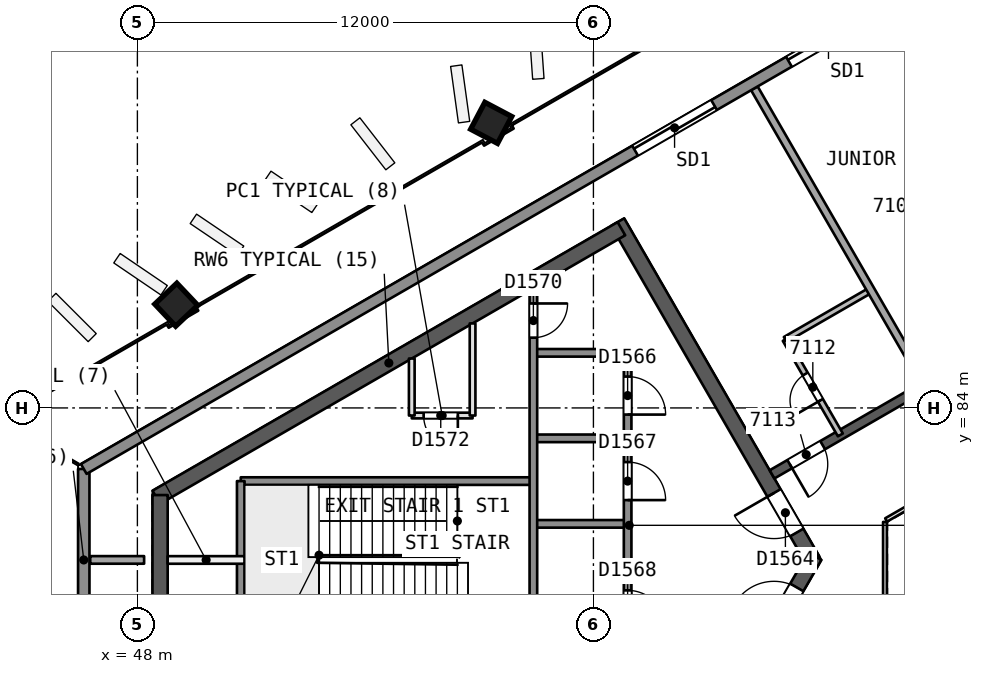
"""IFC4 building model, lengths in metres.
Left out: names, types, materials, properties, quantities, classifications, styles, units other than length and angle.
Written with IfcOpenShell. Run it as: python <this file> out.ifc"""

import sys

from ifc_helpers import new_model, si_unit, direction, frame, frame_2d, origin, origin_2d, place, context, subcontext, project, spatial, rectangle, extrude, element, fill, save


model = new_model("IFC4")
c1 = context("Model", 3, precision=1e-05, world=origin(), true_north=direction((0.0, 1.0)))
c2 = subcontext(c1, "Body", "Model", "MODEL_VIEW")
j1 = project(units=[si_unit("LENGTHUNIT", "METRE"), si_unit("PLANEANGLEUNIT", "RADIAN")], contexts=[c1])
p1 = place(None, origin())
s1 = spatial("IfcSite", under=j1, at=p1, CompositionType="ELEMENT")
p2 = place(p1, origin())
s2 = spatial("IfcBuilding", under=s1, at=p2, CompositionType="ELEMENT")
p3 = place(p2, frame((0.0, 0.0, 288.6)))
s3 = spatial("IfcBuildingStorey", under=s2, at=p3, CompositionType="ELEMENT", Elevation=288.6)
p4 = place(p3, frame((65.769, 80.0, 0.0), z_axis=(0.0, 0.0, 1.0), x_axis=(-0.50000177223, 0.866024380585, 0.0)))
e1 = element("IfcWall", 1, at=p4, inside=s3, PredefinedType="SHEAR", context=c2, shape_type="SweptSolid", body=[
    extrude(rectangle(XDim=10.265, YDim=0.4, at=frame_2d((5.132, 0.0))), origin(), (0.0, 0.0, 1.0), 3.7),
])
p5 = place(p4, frame((0.834, 0.0, 0.0)))
e2 = element("IfcOpeningElement", 2, at=p5, cuts=e1, PredefinedType="OPENING", context=c2, shape_type="SweptSolid", body=[
    extrude(rectangle(XDim=1.2, YDim=2.1, at=frame_2d((0.6, 1.05))), frame((0.0, 0.21, 0.0), z_axis=(0.0, -1.0, 0.0), x_axis=(1.0, 0.0, 0.0)), (0.0, 0.0, 1.0), 0.421),
])
p6 = place(p3, frame((60.737, 88.716, 0.0), z_axis=(0.0, 0.0, 1.0), x_axis=(-0.866028812667, -0.499994095595, 0.0)))
e3 = element("IfcWall", 3, at=p6, inside=s3, PredefinedType="SHEAR", context=c2, shape_type="SweptSolid", body=[
    extrude(rectangle(XDim=14.134, YDim=0.4, at=frame_2d((7.067, 0.0))), origin(), (0.0, 0.0, 1.0), 3.7),
])
p7 = place(p3, frame((48.597, 81.707, 0.0), z_axis=(0.0, 0.0, 1.0), x_axis=(0.0, -1.0, 0.0)))
e4 = element("IfcWall", 4, at=p7, inside=s3, PredefinedType="SHEAR", context=c2, shape_type="SweptSolid", body=[
    extrude(rectangle(XDim=3.53, YDim=0.4, at=frame_2d((1.765, 0.0))), origin(), (0.0, 0.0, 1.0), 3.7),
])
p8 = place(p3, frame((60.737, 71.284, 0.0), z_axis=(0.0, 0.0, 1.0), x_axis=(0.50000547566, 0.866022242388, 0.0)))
e5 = element("IfcWall", 5, at=p8, inside=s3, PredefinedType="SHEAR", context=c2, shape_type="SweptSolid", body=[
    extrude(rectangle(XDim=10.18, YDim=0.4, at=frame_2d((5.09, 0.0))), origin(), (0.0, 0.0, 1.0), 3.7),
])
p9 = place(p8, frame((8.03, 0.0, 0.0)))
e6 = element("IfcOpeningElement", 6, at=p9, cuts=e5, PredefinedType="OPENING", context=c2, shape_type="SweptSolid", body=[
    extrude(rectangle(XDim=1.2, YDim=2.1, at=frame_2d((0.6, 1.05))), frame((0.0, 0.21, 0.0), z_axis=(0.0, -1.0, 0.0), x_axis=(1.0, 0.0, 0.0)), (0.0, 0.0, 1.0), 0.421),
])
p10 = place(p3, frame((78.2, 90.046, 0.0), z_axis=(0.0, 0.0, 1.0), x_axis=(-0.866026492143, -0.499998114903, 0.0)))
e7 = element("IfcWall", 7, at=p10, inside=s3, PredefinedType="SHEAR", context=c2, shape_type="SweptSolid", body=[
    extrude(rectangle(XDim=15.588, YDim=0.25, at=frame_2d((7.794, 0.0))), origin(), (0.0, 0.0, 1.0), 3.3),
])
p11 = place(p10, frame((4.718, 0.0, 0.0)))
e8 = element("IfcOpeningElement", 8, at=p11, cuts=e7, PredefinedType="OPENING", context=c2, shape_type="SweptSolid", body=[
    extrude(rectangle(XDim=1.0, YDim=2.1, at=frame_2d((0.5, 1.05))), frame((0.0, 0.135, 0.0), z_axis=(0.0, -1.0, 0.0), x_axis=(1.0, 0.0, 0.0)), (0.0, 0.0, 1.0), 0.271),
])
p12 = place(p10, frame((9.374, 0.0, 0.0)))
e9 = element("IfcOpeningElement", 9, at=p12, cuts=e7, PredefinedType="OPENING", context=c2, shape_type="SweptSolid", body=[
    extrude(rectangle(XDim=1.0, YDim=2.1, at=frame_2d((0.5, 1.05))), frame((0.0, 0.135, 0.0), z_axis=(0.0, -1.0, 0.0), x_axis=(1.0, 0.0, 0.0)), (0.0, 0.0, 1.0), 0.271),
])
p13 = place(p10, frame((14.05, 0.0, 0.0)))
e10 = element("IfcOpeningElement", 10, at=p13, cuts=e7, PredefinedType="OPENING", context=c2, shape_type="SweptSolid", body=[
    extrude(rectangle(XDim=1.0, YDim=2.1, at=frame_2d((0.5, 1.05))), frame((0.0, 0.135, 0.0), z_axis=(0.0, -1.0, 0.0), x_axis=(1.0, 0.0, 0.0)), (0.0, 0.0, 1.0), 0.271),
])
p14 = place(p3, frame((57.287, 91.515, 0.0), z_axis=(0.019328516974, -0.012138044789, 0.999739504221), x_axis=(-0.500205614953, 0.865671455024, 0.020181048691)))
e11 = element("IfcColumn", 11, at=p14, inside=s3, PredefinedType="COLUMN", context=c2, shape_type="SweptSolid", body=[
    extrude(rectangle(XDim=0.8, YDim=0.8, at=origin_2d()), origin(), (0.0, 0.0, 1.0), 3.701),
])
p15 = place(p3, frame((48.989, 86.724, 0.0), z_axis=(0.02855911485, -0.006793507689, 0.999569019734), x_axis=(-0.500407643461, 0.865554709988, 0.020180049142)))
e12 = element("IfcColumn", 12, at=p15, inside=s3, PredefinedType="COLUMN", context=c2, shape_type="SweptSolid", body=[
    extrude(rectangle(XDim=0.8, YDim=0.8, at=origin_2d()), origin(), (0.0, 0.0, 1.0), 3.702),
])
p16 = place(p3, frame((64.235, 92.41, 0.0), z_axis=(0.0, 0.0, 1.0), x_axis=(0.500006411147, -0.866021702275, 0.0)))
e13 = element("IfcWall", 13, at=p16, inside=s3, PredefinedType="PARTITIONING", context=c2, shape_type="SweptSolid", body=[
    extrude(rectangle(XDim=9.03, YDim=0.2, at=frame_2d((4.515, 0.0))), origin(), (0.0, 0.0, 1.0), 3.3),
])
p17 = place(p3, frame((66.498, 83.29, 0.0), z_axis=(0.0, 0.0, 1.0), x_axis=(-0.499987231761, 0.866032775405, 0.0)))
e14 = element("IfcWall", 14, at=p17, inside=s3, PredefinedType="PARTITIONING", context=c2, shape_type="SweptSolid", body=[
    extrude(rectangle(XDim=2.9, YDim=0.15, at=frame_2d((1.45, 0.0))), origin(), (0.0, 0.0, 1.0), 3.3),
])
p18 = place(p17, frame((1.05, 0.0, 0.0)))
e15 = element("IfcOpeningElement", 15, at=p18, cuts=e14, PredefinedType="OPENING", context=c2, shape_type="SweptSolid", body=[
    extrude(rectangle(XDim=0.8, YDim=2.1, at=frame_2d((0.4, 1.05))), frame((0.0, 0.085, 0.0), z_axis=(0.0, -1.0, 0.0), x_axis=(1.0, 0.0, 0.0)), (0.0, 0.0, 1.0), 0.171),
])
p19 = place(p3, frame((65.048, 85.802, 0.0), z_axis=(0.0, 0.0, 1.0), x_axis=(0.866062058628, 0.499936506574, 0.0)))
e16 = element("IfcWall", 16, at=p19, inside=s3, PredefinedType="PARTITIONING", context=c2, shape_type="SweptSolid", body=[
    extrude(rectangle(XDim=2.6, YDim=0.15, at=frame_2d((1.3, 0.0))), origin(), (0.0, 0.0, 1.0), 3.3),
])
p20 = place(p3, frame((46.759, 80.001, 0.0), z_axis=(0.0, 0.0, 1.0), x_axis=(1.0, 0.0, 0.0)))
e17 = element("IfcWall", 17, at=p20, inside=s3, PredefinedType="PARTITIONING", context=c2, shape_type="SweptSolid", body=[
    extrude(rectangle(XDim=1.418, YDim=0.2, at=frame_2d((0.709, 0.0))), origin(), (0.0, 0.0, 1.0), 3.3),
])
p21 = place(p3, frame((46.589, 77.606, 0.0), z_axis=(0.0, 0.0, 1.0), x_axis=(0.0, 1.0, 0.0)))
e18 = element("IfcWall", 18, at=p21, inside=s3, PredefinedType="SOLIDWALL", context=c2, shape_type="SweptSolid", body=[
    extrude(rectangle(XDim=4.789, YDim=0.3, at=frame_2d((2.394, 0.0))), origin(), (0.0, 0.0, 1.0), 3.3),
])
p22 = place(p3, frame((46.589, 82.394, 0.0), z_axis=(0.0, 0.0, 1.0), x_axis=(0.866024664133, 0.500001281111, 0.0)))
e19 = element("IfcWall", 19, at=p22, inside=s3, PredefinedType="SOLIDWALL", context=c2, shape_type="SweptSolid", body=[
    extrude(rectangle(XDim=46.815, YDim=0.3, at=frame_2d((23.408, 0.0))), origin(), (0.0, 0.0, 1.0), 3.3),
])
p23 = place(p22, frame((16.752, 0.0, 0.0)))
e20 = element("IfcOpeningElement", 20, at=p23, cuts=e19, PredefinedType="OPENING", context=c2, shape_type="SweptSolid", body=[
    extrude(rectangle(XDim=2.4, YDim=2.4, at=frame_2d((1.2, 1.2))), frame((0.0, 0.161, 0.0), z_axis=(0.0, -1.0, 0.0), x_axis=(1.0, 0.0, 0.0)), (0.0, 0.0, 1.0), 0.321),
])
p24 = place(p22, frame((26.884, 0.0, 0.0)))
e21 = element("IfcOpeningElement", 21, at=p24, cuts=e19, PredefinedType="OPENING", context=c2, shape_type="SweptSolid", body=[
    extrude(rectangle(XDim=2.4, YDim=2.4, at=frame_2d((1.2, 1.2))), frame((0.0, 0.161, 0.0), z_axis=(0.0, -1.0, 0.0), x_axis=(1.0, 0.0, 0.0)), (0.0, 0.0, 1.0), 0.321),
])
p25 = place(p22, frame((21.428, 0.0, 0.0)))
e22 = element("IfcOpeningElement", 22, at=p25, cuts=e19, PredefinedType="OPENING", context=c2, shape_type="SweptSolid", body=[
    extrude(rectangle(XDim=2.4, YDim=2.4, at=frame_2d((1.2, 1.2))), frame((0.0, 0.161, 0.0), z_axis=(0.0, -1.0, 0.0), x_axis=(1.0, 0.0, 0.0)), (0.0, 0.0, 1.0), 0.321),
])
p26 = place(p3, frame((60.9, 85.45, 0.0), z_axis=(0.0, 0.0, 1.0), x_axis=(-1.0, 0.0, 0.0)))
e23 = element("IfcWall", 23, at=p26, inside=s3, PredefinedType="SOLIDWALL", context=c2, shape_type="SweptSolid", body=[
    extrude(rectangle(XDim=2.48, YDim=0.2, at=frame_2d((1.24, 0.0))), origin(), (0.0, 0.0, 1.0), 3.3),
])
p27 = place(p3, frame((56.82, 83.8, 0.0), z_axis=(0.0, 0.0, 1.0), x_axis=(-1.0, 0.0, 0.0)))
e24 = element("IfcWall", 24, at=p27, inside=s3, PredefinedType="PARTITIONING", context=c2, shape_type="SweptSolid", body=[
    extrude(rectangle(XDim=1.6, YDim=0.15, at=frame_2d((0.8, 0.0))), origin(), (0.0, 0.0, 1.0), 3.3),
])
p28 = place(p27, frame((0.387, 0.0, 0.0)))
e25 = element("IfcOpeningElement", 25, at=p28, cuts=e24, PredefinedType="OPENING", context=c2, shape_type="SweptSolid", body=[
    extrude(rectangle(XDim=0.9, YDim=2.1, at=frame_2d((0.45, 1.05))), frame((0.0, 0.085, 0.0), z_axis=(0.0, -1.0, 0.0), x_axis=(1.0, 0.0, 0.0)), (0.0, 0.0, 1.0), 0.171),
])
p29 = place(p3, frame((60.9, 83.2, 0.0), z_axis=(0.0, 0.0, 1.0), x_axis=(-1.0, 0.0, 0.0)))
e26 = element("IfcWall", 26, at=p29, inside=s3, PredefinedType="SOLIDWALL", context=c2, shape_type="SweptSolid", body=[
    extrude(rectangle(XDim=2.48, YDim=0.2, at=frame_2d((1.24, 0.0))), origin(), (0.0, 0.0, 1.0), 3.3),
])
p30 = place(p3, frame((58.42, 82.075, 0.0), z_axis=(0.0, 0.0, 1.0), x_axis=(-1.0, 0.0, 0.0)))
e27 = element("IfcWall", 27, at=p30, inside=s3, PredefinedType="SOLIDWALL", context=c2, shape_type="SweptSolid", body=[
    extrude(rectangle(XDim=7.7, YDim=0.2, at=frame_2d((3.85, 0.0))), origin(), (0.0, 0.0, 1.0), 3.3),
])
p31 = place(p3, frame((60.9, 80.95, 0.0), z_axis=(0.0, 0.0, 1.0), x_axis=(-1.0, 0.0, 0.0)))
e28 = element("IfcWall", 28, at=p31, inside=s3, PredefinedType="SOLIDWALL", context=c2, shape_type="SweptSolid", body=[
    extrude(rectangle(XDim=2.48, YDim=0.2, at=frame_2d((1.24, 0.0))), origin(), (0.0, 0.0, 1.0), 3.3),
])
p32 = place(p3, frame((50.82, 80.0, 0.0), z_axis=(0.0, 0.0, 1.0), x_axis=(-1.0, 0.0, 0.0)))
e29 = element("IfcWall", 29, at=p32, inside=s3, PredefinedType="PARTITIONING", context=c2, shape_type="SweptSolid", body=[
    extrude(rectangle(XDim=2.023, YDim=0.2, at=frame_2d((1.012, 0.0))), origin(), (0.0, 0.0, 1.0), 3.3),
])
p33 = place(p3, frame((60.9, 85.45, 0.0), z_axis=(0.0, 0.0, 1.0), x_axis=(0.0, -1.0, 0.0)))
e30 = element("IfcWall", 30, at=p33, inside=s3, PredefinedType="SOLIDWALL", context=c2, shape_type="SweptSolid", body=[
    extrude(rectangle(XDim=10.9, YDim=0.2, at=frame_2d((5.45, 0.0))), origin(), (0.0, 0.0, 1.0), 3.3),
])
p34 = place(p33, frame((0.625, 0.0, 0.0)))
e31 = element("IfcOpeningElement", 31, at=p34, cuts=e30, PredefinedType="OPENING", context=c2, shape_type="SweptSolid", body=[
    extrude(rectangle(XDim=1.0, YDim=2.1, at=frame_2d((0.5, 1.05))), frame((0.0, 0.11, 0.0), z_axis=(0.0, -1.0, 0.0), x_axis=(1.0, 0.0, 0.0)), (0.0, 0.0, 1.0), 0.221),
])
p35 = place(p33, frame((2.875, 0.0, 0.0)))
e32 = element("IfcOpeningElement", 32, at=p35, cuts=e30, PredefinedType="OPENING", context=c2, shape_type="SweptSolid", body=[
    extrude(rectangle(XDim=1.0, YDim=2.1, at=frame_2d((0.5, 1.05))), frame((0.0, 0.11, 0.0), z_axis=(0.0, -1.0, 0.0), x_axis=(1.0, 0.0, 0.0)), (0.0, 0.0, 1.0), 0.221),
])
p36 = place(p33, frame((6.25, 0.0, 0.0)))
e33 = element("IfcOpeningElement", 33, at=p36, cuts=e30, PredefinedType="OPENING", context=c2, shape_type="SweptSolid", body=[
    extrude(rectangle(XDim=1.0, YDim=2.1, at=frame_2d((0.5, 1.05))), frame((0.0, 0.11, 0.0), z_axis=(0.0, -1.0, 0.0), x_axis=(1.0, 0.0, 0.0)), (0.0, 0.0, 1.0), 0.221),
])
p37 = place(p3, frame((58.42, 87.148, 0.0), z_axis=(0.0, 0.0, 1.0), x_axis=(0.0, -1.0, 0.0)))
e34 = element("IfcWall", 34, at=p37, inside=s3, PredefinedType="SOLIDWALL", context=c2, shape_type="SweptSolid", body=[
    extrude(rectangle(XDim=10.698, YDim=0.2, at=frame_2d((5.349, 0.0))), origin(), (0.0, 0.0, 1.0), 3.3),
])
p38 = place(p37, frame((0.399, 0.0, 0.0)))
e35 = element("IfcOpeningElement", 35, at=p38, cuts=e34, PredefinedType="OPENING", context=c2, shape_type="SweptSolid", body=[
    extrude(rectangle(XDim=0.9, YDim=2.1, at=frame_2d((0.45, 1.05))), frame((0.0, 0.11, 0.0), z_axis=(0.0, -1.0, 0.0), x_axis=(1.0, 0.0, 0.0)), (0.0, 0.0, 1.0), 0.221),
])
p39 = place(p3, frame((56.82, 86.224, 0.0), z_axis=(0.0, 0.0, 1.0), x_axis=(0.0, -1.0, 0.0)))
e36 = element("IfcWall", 36, at=p39, inside=s3, PredefinedType="PARTITIONING", context=c2, shape_type="SweptSolid", body=[
    extrude(rectangle(XDim=2.424, YDim=0.15, at=frame_2d((1.212, 0.0))), origin(), (0.0, 0.0, 1.0), 3.3),
])
p40 = place(p3, frame((55.22, 85.3, 0.0), z_axis=(0.0, 0.0, 1.0), x_axis=(0.0, -1.0, 0.0)))
e37 = element("IfcWall", 37, at=p40, inside=s3, PredefinedType="PARTITIONING", context=c2, shape_type="SweptSolid", body=[
    extrude(rectangle(XDim=1.5, YDim=0.15, at=frame_2d((0.75, 0.0))), origin(), (0.0, 0.0, 1.0), 3.3),
])
p41 = place(p3, frame((50.72, 82.075, 0.0), z_axis=(0.0, 0.0, 1.0), x_axis=(0.0, -1.0, 0.0)))
e38 = element("IfcWall", 38, at=p41, inside=s3, PredefinedType="SOLIDWALL", context=c2, shape_type="SweptSolid", body=[
    extrude(rectangle(XDim=4.15, YDim=0.2, at=frame_2d((2.075, 0.0))), origin(), (0.0, 0.0, 1.0), 3.3),
])
p42 = place(p3, frame((77.738, 86.846, 0.0), z_axis=(0.0, 0.0, 1.0), x_axis=(-0.866026658274, -0.499997827154, 0.0)))
e39 = element("IfcWall", 39, at=p42, inside=s3, PredefinedType="PARTITIONING", context=c2, shape_type="SweptSolid", body=[
    extrude(rectangle(XDim=11.588, YDim=0.1, at=frame_2d((5.794, 0.0))), origin(), (0.0, 0.0, 1.0), 3.3),
])
p43 = place(p3, frame((67.672, 81.0, 0.0), z_axis=(0.0, 0.0, 1.0), x_axis=(0.0, -1.0, 0.0)))
e40 = element("IfcWall", 40, at=p43, inside=s3, PredefinedType="PARTITIONING", context=c2, shape_type="SweptSolid", body=[
    extrude(rectangle(XDim=2.0, YDim=0.1, at=frame_2d((1.0, 0.0))), origin(), (0.0, 0.0, 1.0), 3.3),
])
p44 = place(p18, origin())
e41 = element("IfcDoor", 41, at=p44, inside=s3, OperationType="SINGLE_SWING_LEFT", PredefinedType="NOTDEFINED", context=c2, shape_type="SweptSolid", body=[
    extrude(rectangle(XDim=0.8, YDim=2.1, at=frame_2d((0.4, 1.05))), frame((0.0, 0.025, 0.0), z_axis=(0.0, -1.0, 0.0), x_axis=(1.0, 0.0, 0.0)), (0.0, 0.0, 1.0), 0.05),
])
fill(e15, e41)
p45 = place(p13, origin())
e42 = element("IfcDoor", 42, at=p45, inside=s3, OperationType="SINGLE_SWING_RIGHT", PredefinedType="NOTDEFINED", context=c2, shape_type="SweptSolid", body=[
    extrude(rectangle(XDim=1.0, YDim=2.1, at=frame_2d((0.5, 1.05))), frame((0.0, 0.025, 0.0), z_axis=(0.0, -1.0, 0.0), x_axis=(1.0, 0.0, 0.0)), (0.0, 0.0, 1.0), 0.05),
])
fill(e10, e42)
p46 = place(p23, origin())
e43 = element("IfcDoor", 43, at=p46, inside=s3, OperationType="SLIDING_TO_LEFT", PredefinedType="NOTDEFINED", context=c2, shape_type="SweptSolid", body=[
    extrude(rectangle(XDim=2.4, YDim=2.4, at=frame_2d((1.2, 1.2))), frame((0.0, 0.025, 0.0), z_axis=(0.0, -1.0, 0.0), x_axis=(1.0, 0.0, 0.0)), (0.0, 0.0, 1.0), 0.05),
])
fill(e20, e43)
p47 = place(p25, origin())
e44 = element("IfcDoor", 44, at=p47, inside=s3, OperationType="SLIDING_TO_LEFT", PredefinedType="NOTDEFINED", context=c2, shape_type="SweptSolid", body=[
    extrude(rectangle(XDim=2.4, YDim=2.4, at=frame_2d((1.2, 1.2))), frame((0.0, 0.025, 0.0), z_axis=(0.0, -1.0, 0.0), x_axis=(1.0, 0.0, 0.0)), (0.0, 0.0, 1.0), 0.05),
])
fill(e22, e44)
p48 = place(p5, origin())
e45 = element("IfcDoor", 45, at=p48, inside=s3, OperationType="SINGLE_SWING_RIGHT", PredefinedType="NOTDEFINED", context=c2, shape_type="SweptSolid", body=[
    extrude(rectangle(XDim=1.2, YDim=2.1, at=frame_2d((0.6, 1.05))), frame((0.0, 0.025, 0.0), z_axis=(0.0, -1.0, 0.0), x_axis=(1.0, 0.0, 0.0)), (0.0, 0.0, 1.0), 0.05),
])
fill(e2, e45)
p49 = place(p9, origin())
e46 = element("IfcDoor", 46, at=p49, inside=s3, OperationType="SINGLE_SWING_LEFT", PredefinedType="NOTDEFINED", context=c2, shape_type="SweptSolid", body=[
    extrude(rectangle(XDim=1.2, YDim=2.1, at=frame_2d((0.6, 1.05))), frame((0.0, 0.025, 0.0), z_axis=(0.0, -1.0, 0.0), x_axis=(1.0, 0.0, 0.0)), (0.0, 0.0, 1.0), 0.05),
])
fill(e6, e46)
p50 = place(p34, origin())
e47 = element("IfcDoor", 47, at=p50, inside=s3, OperationType="SINGLE_SWING_RIGHT", PredefinedType="NOTDEFINED", context=c2, shape_type="SweptSolid", body=[
    extrude(rectangle(XDim=1.0, YDim=2.1, at=frame_2d((0.5, 1.05))), frame((0.0, 0.025, 0.0), z_axis=(0.0, -1.0, 0.0), x_axis=(1.0, 0.0, 0.0)), (0.0, 0.0, 1.0), 0.05),
])
fill(e31, e47)
p51 = place(p35, origin())
e48 = element("IfcDoor", 48, at=p51, inside=s3, OperationType="SINGLE_SWING_RIGHT", PredefinedType="NOTDEFINED", context=c2, shape_type="SweptSolid", body=[
    extrude(rectangle(XDim=1.0, YDim=2.1, at=frame_2d((0.5, 1.05))), frame((0.0, 0.025, 0.0), z_axis=(0.0, -1.0, 0.0), x_axis=(1.0, 0.0, 0.0)), (0.0, 0.0, 1.0), 0.05),
])
fill(e32, e48)
p52 = place(p36, origin())
e49 = element("IfcDoor", 49, at=p52, inside=s3, OperationType="SINGLE_SWING_RIGHT", PredefinedType="NOTDEFINED", context=c2, shape_type="SweptSolid", body=[
    extrude(rectangle(XDim=1.0, YDim=2.1, at=frame_2d((0.5, 1.05))), frame((0.0, 0.025, 0.0), z_axis=(0.0, -1.0, 0.0), x_axis=(1.0, 0.0, 0.0)), (0.0, 0.0, 1.0), 0.05),
])
fill(e33, e49)
p53 = place(p38, origin())
e50 = element("IfcDoor", 50, at=p53, inside=s3, OperationType="SINGLE_SWING_LEFT", PredefinedType="NOTDEFINED", context=c2, shape_type="SweptSolid", body=[
    extrude(rectangle(XDim=0.9, YDim=2.1, at=frame_2d((0.45, 1.05))), frame((0.0, 0.025, 0.0), z_axis=(0.0, -1.0, 0.0), x_axis=(1.0, 0.0, 0.0)), (0.0, 0.0, 1.0), 0.05),
])
fill(e35, e50)
p54 = place(p28, origin())
e51 = element("IfcDoor", 51, at=p54, inside=s3, OperationType="SINGLE_SWING_LEFT", PredefinedType="NOTDEFINED", context=c2, shape_type="SweptSolid", body=[
    extrude(rectangle(XDim=0.9, YDim=2.1, at=frame_2d((0.45, 1.05))), frame((0.0, 0.025, 0.0), z_axis=(0.0, -1.0, 0.0), x_axis=(1.0, 0.0, 0.0)), (0.0, 0.0, 1.0), 0.05),
])
fill(e25, e51)
save(model, sys.argv[1])
